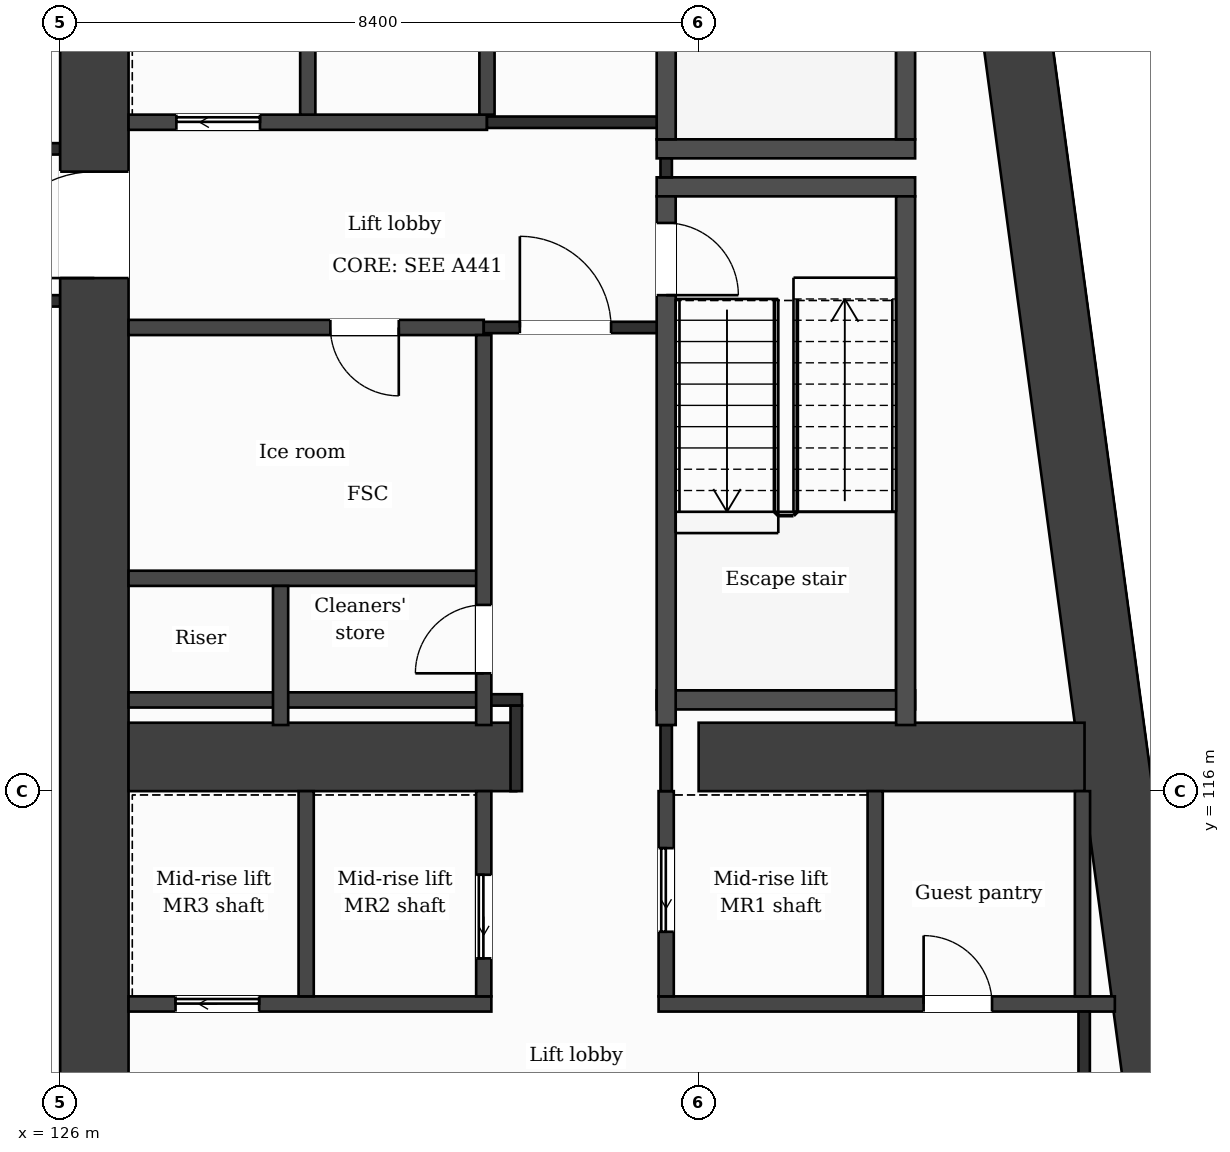
"""IFC4 building model, lengths in metres.
Left out: names, types, materials, properties, quantities, classifications, styles, units other than length and angle.
Written with IfcOpenShell. Run it as: python <this file> out.ifc"""

import sys

from ifc_helpers import new_model, si_unit, direction, frame, frame_2d, origin, place, context, subcontext, project, spatial, rectangle, extrude, element, fill, save


model = new_model("IFC4")
c1 = context("Model", 3, precision=1e-05, world=origin(), true_north=direction((0.0, 1.0)))
c2 = subcontext(c1, "Body", "Model", "MODEL_VIEW")
j1 = project(units=[si_unit("LENGTHUNIT", "METRE"), si_unit("PLANEANGLEUNIT", "RADIAN")], contexts=[c1])
p1 = place(None, origin())
s1 = spatial("IfcSite", under=j1, at=p1, CompositionType="ELEMENT")
p2 = place(p1, origin())
s2 = spatial("IfcBuilding", under=s1, at=p2, CompositionType="ELEMENT")
p3 = place(p2, frame((0.0, 0.0, 170.0)))
s3 = spatial("IfcBuildingStorey", under=s2, at=p3, CompositionType="ELEMENT", Elevation=170.0)
p4 = place(p3, frame((137.776, 131.95, 0.0), z_axis=(0.0, 0.0, 1.0), x_axis=(0.133421759112, -0.991059349482, 0.0)))
e1 = element("IfcWall", 1, at=p4, inside=s3, PredefinedType="SHEAR", context=c2, shape_type="SweptSolid", body=[
    extrude(rectangle(XDim=21.29, YDim=0.9, at=frame_2d((10.645, 0.0))), origin(), (0.0, 0.0, 1.0), 3.7),
])
p5 = place(p3, frame((126.45, 110.85, 0.0), z_axis=(0.0, 0.0, 1.0), x_axis=(0.0, 1.0, 0.0)))
e2 = element("IfcWall", 2, at=p5, inside=s3, PredefinedType="SHEAR", context=c2, shape_type="SweptSolid", body=[
    extrude(rectangle(XDim=21.1, YDim=0.9, at=frame_2d((10.55, 0.0))), origin(), (0.0, 0.0, 1.0), 3.7),
])
p6 = place(p5, frame((11.9, 0.0, 0.0)))
e3 = element("IfcOpeningElement", 3, at=p6, cuts=e2, PredefinedType="OPENING", context=c2, shape_type="SweptSolid", body=[
    extrude(rectangle(XDim=1.4, YDim=2.1, at=frame_2d((0.7, 1.05))), frame((0.0, 0.46, 0.0), z_axis=(0.0, -1.0, 0.0), x_axis=(1.0, 0.0, 0.0)), (0.0, 0.0, 1.0), 0.92),
])
p7 = place(p3, frame((126.9, 116.45, 0.0), z_axis=(0.0, 0.0, 1.0), x_axis=(1.0, 0.0, 0.0)))
e4 = element("IfcWall", 4, at=p7, inside=s3, PredefinedType="SHEAR", context=c2, shape_type="SweptSolid", body=[
    extrude(rectangle(XDim=5.1, YDim=0.9, at=frame_2d((2.55, 0.0))), origin(), (0.0, 0.0, 1.0), 3.7),
])
p8 = place(p3, frame((134.4, 116.45, 0.0), z_axis=(0.0, 0.0, 1.0), x_axis=(1.0, 0.0, 0.0)))
e5 = element("IfcWall", 5, at=p8, inside=s3, PredefinedType="SHEAR", context=c2, shape_type="SweptSolid", body=[
    extrude(rectangle(XDim=5.077, YDim=0.9, at=frame_2d((2.539, 0.0))), origin(), (0.0, 0.0, 1.0), 3.7),
])
p9 = place(p3, frame((126.9, 113.2, 0.0), z_axis=(0.0, 0.0, 1.0), x_axis=(1.0, 0.0, 0.0)))
e6 = element("IfcWall", 6, at=p9, inside=s3, PredefinedType="PARTITIONING", context=c2, shape_type="SweptSolid", body=[
    extrude(rectangle(XDim=4.773, YDim=0.2, at=frame_2d((2.387, 0.0))), origin(), (0.0, 0.0, 1.0), 3.38),
])
p10 = place(p9, frame((0.618, 0.0, 0.0)))
e7 = element("IfcOpeningElement", 7, at=p10, cuts=e6, PredefinedType="OPENING", context=c2, shape_type="SweptSolid", body=[
    extrude(rectangle(XDim=1.1, YDim=2.1, at=frame_2d((0.55, 1.05))), frame((0.0, 0.11, 0.0), z_axis=(0.0, -1.0, 0.0), x_axis=(1.0, 0.0, 0.0)), (0.0, 0.0, 1.0), 0.22),
])
p11 = place(p3, frame((133.873, 113.2, 0.0), z_axis=(0.0, 0.0, 1.0), x_axis=(1.0, 0.0, 0.0)))
e8 = element("IfcWall", 8, at=p11, inside=s3, PredefinedType="PARTITIONING", context=c2, shape_type="SweptSolid", body=[
    extrude(rectangle(XDim=6.003, YDim=0.2, at=frame_2d((3.001, 0.0))), origin(), (0.0, 0.0, 1.0), 3.38),
])
p12 = place(p11, frame((3.487, 0.0, 0.0)))
e9 = element("IfcOpeningElement", 9, at=p12, cuts=e8, PredefinedType="OPENING", context=c2, shape_type="SweptSolid", body=[
    extrude(rectangle(XDim=0.9, YDim=2.1, at=frame_2d((0.45, 1.05))), frame((0.0, 0.11, 0.0), z_axis=(0.0, -1.0, 0.0), x_axis=(1.0, 0.0, 0.0)), (0.0, 0.0, 1.0), 0.22),
])
p13 = place(p3, frame((126.9, 117.2, 0.0), z_axis=(0.0, 0.0, 1.0), x_axis=(1.0, 0.0, 0.0)))
e10 = element("IfcWall", 10, at=p13, inside=s3, PredefinedType="PARTITIONING", context=c2, shape_type="SweptSolid", body=[
    extrude(rectangle(XDim=4.673, YDim=0.2, at=frame_2d((2.336, 0.0))), origin(), (0.0, 0.0, 1.0), 3.38),
])
p14 = place(p3, frame((131.573, 117.2, 0.0), z_axis=(0.0, 0.0, 1.0), x_axis=(1.0, 0.0, 0.0)))
e11 = element("IfcWall", 11, at=p14, inside=s3, PredefinedType="PARTITIONING", context=c2, shape_type="SweptSolid", body=[
    extrude(rectangle(XDim=0.502, YDim=0.15, at=frame_2d((0.251, 0.0))), origin(), (0.0, 0.0, 1.0), 3.38),
])
p15 = place(p3, frame((133.848, 117.2, 0.0), z_axis=(0.0, 0.0, 1.0), x_axis=(1.0, 0.0, 0.0)))
e12 = element("IfcWall", 12, at=p15, inside=s3, PredefinedType="PARTITIONING", context=c2, shape_type="SweptSolid", body=[
    extrude(rectangle(XDim=3.4, YDim=0.25, at=frame_2d((1.7, 0.0))), origin(), (0.0, 0.0, 1.0), 3.38),
])
p16 = place(p3, frame((126.9, 118.8, 0.0), z_axis=(0.0, 0.0, 1.0), x_axis=(1.0, 0.0, 0.0)))
e13 = element("IfcWall", 13, at=p16, inside=s3, PredefinedType="PARTITIONING", context=c2, shape_type="SweptSolid", body=[
    extrude(rectangle(XDim=4.673, YDim=0.2, at=frame_2d((2.336, 0.0))), origin(), (0.0, 0.0, 1.0), 3.38),
])
p17 = place(p3, frame((126.9, 122.1, 0.0), z_axis=(0.0, 0.0, 1.0), x_axis=(1.0, 0.0, 0.0)))
e14 = element("IfcWall", 14, at=p17, inside=s3, PredefinedType="PARTITIONING", context=c2, shape_type="SweptSolid", body=[
    extrude(rectangle(XDim=4.673, YDim=0.2, at=frame_2d((2.336, 0.0))), origin(), (0.0, 0.0, 1.0), 3.38),
])
p18 = place(p17, frame((2.655, 0.0, 0.0)))
e15 = element("IfcOpeningElement", 15, at=p18, cuts=e14, PredefinedType="OPENING", context=c2, shape_type="SweptSolid", body=[
    extrude(rectangle(XDim=0.9, YDim=2.1, at=frame_2d((0.45, 1.05))), frame((0.0, 0.11, 0.0), z_axis=(0.0, -1.0, 0.0), x_axis=(1.0, 0.0, 0.0)), (0.0, 0.0, 1.0), 0.22),
])
p19 = place(p3, frame((131.573, 122.1, 0.0), z_axis=(0.0, 0.0, 1.0), x_axis=(1.0, 0.0, 0.0)))
e16 = element("IfcWall", 16, at=p19, inside=s3, PredefinedType="PARTITIONING", context=c2, shape_type="SweptSolid", body=[
    extrude(rectangle(XDim=2.4, YDim=0.15, at=frame_2d((1.2, 0.0))), origin(), (0.0, 0.0, 1.0), 3.38),
])
p20 = place(p19, frame((0.475, 0.0, 0.0)))
e17 = element("IfcOpeningElement", 17, at=p20, cuts=e16, PredefinedType="OPENING", context=c2, shape_type="SweptSolid", body=[
    extrude(rectangle(XDim=1.2, YDim=2.1, at=frame_2d((0.6, 1.05))), frame((0.0, 0.085, 0.0), z_axis=(0.0, -1.0, 0.0), x_axis=(1.0, 0.0, 0.0)), (0.0, 0.0, 1.0), 0.17),
])
p21 = place(p3, frame((100.8, 122.45, 0.0), z_axis=(0.0, 0.0, 1.0), x_axis=(1.0, 0.0, 0.0)))
e18 = element("IfcWall", 18, at=p21, inside=s3, PredefinedType="PARTITIONING", context=c2, shape_type="SweptSolid", body=[
    extrude(rectangle(XDim=25.2, YDim=0.15, at=frame_2d((12.6, 0.0))), origin(), (0.0, 0.0, 1.0), 3.38),
])
for number, where, z_axis, x_axis in (
    (19, (133.848, 123.95, 0.0), (0.0, 0.0, 1.0), (1.0, 0.0, 0.0)),
    (20, (133.848, 124.45, 0.0), (0.0, 0.0, 1.0), (1.0, 0.0, 0.0)),
):
    element("IfcWall", number, at=place(p3, frame(where, z_axis=z_axis, x_axis=x_axis)), inside=s3, PredefinedType="PARTITIONING", context=c2, shape_type="SweptSolid", body=[
        extrude(rectangle(XDim=3.4, YDim=0.25, at=frame_2d((1.7, 0.0))), origin(), (0.0, 0.0, 1.0), 3.38),
    ])
p22 = place(p3, frame((100.8, 124.45, 0.0), z_axis=(0.0, 0.0, 1.0), x_axis=(1.0, 0.0, 0.0)))
e21 = element("IfcWall", 21, at=p22, inside=s3, PredefinedType="PARTITIONING", context=c2, shape_type="SweptSolid", body=[
    extrude(rectangle(XDim=25.2, YDim=0.15, at=frame_2d((12.6, 0.0))), origin(), (0.0, 0.0, 1.0), 3.38),
])
p23 = place(p22, frame((4.275, 0.0, 0.0)))
e22 = element("IfcOpeningElement", 22, at=p23, cuts=e21, PredefinedType="OPENING", context=c2, shape_type="SweptSolid", body=[
    extrude(rectangle(XDim=1.0, YDim=2.1, at=frame_2d((0.5, 1.05))), frame((0.0, 0.085, 0.0), z_axis=(0.0, -1.0, 0.0), x_axis=(1.0, 0.0, 0.0)), (0.0, 0.0, 1.0), 0.17),
])
p24 = place(p22, frame((0.675, 0.0, 0.0)))
e23 = element("IfcOpeningElement", 23, at=p24, cuts=e21, PredefinedType="OPENING", context=c2, shape_type="SweptSolid", body=[
    extrude(rectangle(XDim=1.0, YDim=2.1, at=frame_2d((0.5, 1.05))), frame((0.0, 0.085, 0.0), z_axis=(0.0, -1.0, 0.0), x_axis=(1.0, 0.0, 0.0)), (0.0, 0.0, 1.0), 0.17),
])
p25 = place(p22, frame((10.425, 0.0, 0.0)))
e24 = element("IfcOpeningElement", 24, at=p25, cuts=e21, PredefinedType="OPENING", context=c2, shape_type="SweptSolid", body=[
    extrude(rectangle(XDim=1.0, YDim=2.1, at=frame_2d((0.5, 1.05))), frame((0.0, 0.085, 0.0), z_axis=(0.0, -1.0, 0.0), x_axis=(1.0, 0.0, 0.0)), (0.0, 0.0, 1.0), 0.17),
])
p26 = place(p22, frame((22.175, 0.0, 0.0)))
e25 = element("IfcOpeningElement", 25, at=p26, cuts=e21, PredefinedType="OPENING", context=c2, shape_type="SweptSolid", body=[
    extrude(rectangle(XDim=1.0, YDim=2.1, at=frame_2d((0.5, 1.05))), frame((0.0, 0.085, 0.0), z_axis=(0.0, -1.0, 0.0), x_axis=(1.0, 0.0, 0.0)), (0.0, 0.0, 1.0), 0.17),
])
p27 = place(p3, frame((126.9, 124.8, 0.0), z_axis=(0.0, 0.0, 1.0), x_axis=(1.0, 0.0, 0.0)))
e26 = element("IfcWall", 26, at=p27, inside=s3, PredefinedType="PARTITIONING", context=c2, shape_type="SweptSolid", body=[
    extrude(rectangle(XDim=4.715, YDim=0.2, at=frame_2d((2.358, 0.0))), origin(), (0.0, 0.0, 1.0), 3.38),
])
p28 = place(p27, frame((0.629, 0.0, 0.0)))
e27 = element("IfcOpeningElement", 27, at=p28, cuts=e26, PredefinedType="OPENING", context=c2, shape_type="SweptSolid", body=[
    extrude(rectangle(XDim=1.1, YDim=2.1, at=frame_2d((0.55, 1.05))), frame((0.0, 0.11, 0.0), z_axis=(0.0, -1.0, 0.0), x_axis=(1.0, 0.0, 0.0)), (0.0, 0.0, 1.0), 0.22),
])
p29 = place(p3, frame((131.615, 124.8, 0.0), z_axis=(0.0, 0.0, 1.0), x_axis=(1.0, 0.0, 0.0)))
e28 = element("IfcWall", 28, at=p29, inside=s3, PredefinedType="PARTITIONING", context=c2, shape_type="SweptSolid", body=[
    extrude(rectangle(XDim=2.483, YDim=0.15, at=frame_2d((1.241, 0.0))), origin(), (0.0, 0.0, 1.0), 3.38),
])
p30 = place(p3, frame((128.9, 116.87, 0.0), z_axis=(0.0, 0.0, 1.0), x_axis=(0.0, 1.0, 0.0)))
e29 = element("IfcWall", 29, at=p30, inside=s3, PredefinedType="PARTITIONING", context=c2, shape_type="SweptSolid", body=[
    extrude(rectangle(XDim=1.83, YDim=0.2, at=frame_2d((0.915, 0.0))), origin(), (0.0, 0.0, 1.0), 3.38),
])
p31 = place(p3, frame((129.237, 113.3, 0.0), z_axis=(0.0, 0.0, 1.0), x_axis=(0.0, 1.0, 0.0)))
e30 = element("IfcWall", 30, at=p31, inside=s3, PredefinedType="PARTITIONING", context=c2, shape_type="SweptSolid", body=[
    extrude(rectangle(XDim=2.7, YDim=0.2, at=frame_2d((1.35, 0.0))), origin(), (0.0, 0.0, 1.0), 3.38),
])
p32 = place(p3, frame((129.258, 124.9, 0.0), z_axis=(0.0, 0.0, 1.0), x_axis=(0.0, 1.0, 0.0)))
e31 = element("IfcWall", 31, at=p32, inside=s3, PredefinedType="PARTITIONING", context=c2, shape_type="SweptSolid", body=[
    extrude(rectangle(XDim=3.1, YDim=0.2, at=frame_2d((1.55, 0.0))), origin(), (0.0, 0.0, 1.0), 3.38),
])
p33 = place(p3, frame((131.573, 113.3, 0.0), z_axis=(0.0, 0.0, 1.0), x_axis=(0.0, 1.0, 0.0)))
e32 = element("IfcWall", 32, at=p33, inside=s3, PredefinedType="PARTITIONING", context=c2, shape_type="SweptSolid", body=[
    extrude(rectangle(XDim=2.7, YDim=0.2, at=frame_2d((1.35, 0.0))), origin(), (0.0, 0.0, 1.0), 3.38),
])
p34 = place(p33, frame((0.5, 0.0, 0.0)))
e33 = element("IfcOpeningElement", 33, at=p34, cuts=e32, PredefinedType="OPENING", context=c2, shape_type="SweptSolid", body=[
    extrude(rectangle(XDim=1.1, YDim=2.1, at=frame_2d((0.55, 1.05))), frame((0.0, 0.11, 0.0), z_axis=(0.0, -1.0, 0.0), x_axis=(1.0, 0.0, 0.0)), (0.0, 0.0, 1.0), 0.22),
])
p35 = place(p3, frame((131.573, 116.87, 0.0), z_axis=(0.0, 0.0, 1.0), x_axis=(0.0, 1.0, 0.0)))
e34 = element("IfcWall", 34, at=p35, inside=s3, PredefinedType="PARTITIONING", context=c2, shape_type="SweptSolid", body=[
    extrude(rectangle(XDim=5.13, YDim=0.2, at=frame_2d((2.565, 0.0))), origin(), (0.0, 0.0, 1.0), 3.38),
])
p36 = place(p35, frame((0.68, 0.0, 0.0)))
e35 = element("IfcOpeningElement", 35, at=p36, cuts=e34, PredefinedType="OPENING", context=c2, shape_type="SweptSolid", body=[
    extrude(rectangle(XDim=0.9, YDim=2.1, at=frame_2d((0.45, 1.05))), frame((0.0, 0.11, 0.0), z_axis=(0.0, -1.0, 0.0), x_axis=(1.0, 0.0, 0.0)), (0.0, 0.0, 1.0), 0.22),
])
p37 = place(p3, frame((131.615, 124.9, 0.0), z_axis=(0.0, 0.0, 1.0), x_axis=(0.0, 1.0, 0.0)))
e36 = element("IfcWall", 36, at=p37, inside=s3, PredefinedType="PARTITIONING", context=c2, shape_type="SweptSolid", body=[
    extrude(rectangle(XDim=3.1, YDim=0.2, at=frame_2d((1.55, 0.0))), origin(), (0.0, 0.0, 1.0), 3.38),
])
p38 = place(p3, frame((132.0, 116.0, 0.0), z_axis=(0.0, 0.0, 1.0), x_axis=(0.0, 1.0, 0.0)))
e37 = element("IfcWall", 37, at=p38, inside=s3, PredefinedType="PARTITIONING", context=c2, shape_type="SweptSolid", body=[
    extrude(rectangle(XDim=1.125, YDim=0.15, at=frame_2d((0.562, 0.0))), origin(), (0.0, 0.0, 1.0), 3.38),
])
p39 = place(p3, frame((133.973, 113.3, 0.0), z_axis=(0.0, 0.0, 1.0), x_axis=(0.0, 1.0, 0.0)))
e38 = element("IfcWall", 38, at=p39, inside=s3, PredefinedType="PARTITIONING", context=c2, shape_type="SweptSolid", body=[
    extrude(rectangle(XDim=2.7, YDim=0.2, at=frame_2d((1.35, 0.0))), origin(), (0.0, 0.0, 1.0), 3.38),
])
p40 = place(p39, frame((0.85, 0.0, 0.0)))
e39 = element("IfcOpeningElement", 39, at=p40, cuts=e38, PredefinedType="OPENING", context=c2, shape_type="SweptSolid", body=[
    extrude(rectangle(XDim=1.1, YDim=2.1, at=frame_2d((0.55, 1.05))), frame((0.0, 0.11, 0.0), z_axis=(0.0, -1.0, 0.0), x_axis=(1.0, 0.0, 0.0)), (0.0, 0.0, 1.0), 0.22),
])
p41 = place(p3, frame((133.973, 116.0, 0.0), z_axis=(0.0, 0.0, 1.0), x_axis=(0.0, 1.0, 0.0)))
e40 = element("IfcWall", 40, at=p41, inside=s3, PredefinedType="PARTITIONING", context=c2, shape_type="SweptSolid", body=[
    extrude(rectangle(XDim=0.87, YDim=0.15, at=frame_2d((0.435, 0.0))), origin(), (0.0, 0.0, 1.0), 3.38),
])
p42 = place(p3, frame((133.973, 124.075, 0.0), z_axis=(0.0, 0.0, 1.0), x_axis=(0.0, 1.0, 0.0)))
e41 = element("IfcWall", 41, at=p42, inside=s3, PredefinedType="PARTITIONING", context=c2, shape_type="SweptSolid", body=[
    extrude(rectangle(XDim=0.25, YDim=0.15, at=frame_2d((0.125, 0.0))), origin(), (0.0, 0.0, 1.0), 3.38),
])
p43 = place(p3, frame((133.973, 116.87, 0.0), z_axis=(0.0, 0.0, 1.0), x_axis=(0.0, 1.0, 0.0)))
e42 = element("IfcWall", 42, at=p43, inside=s3, PredefinedType="PARTITIONING", context=c2, shape_type="SweptSolid", body=[
    extrude(rectangle(XDim=6.955, YDim=0.25, at=frame_2d((3.478, 0.0))), origin(), (0.0, 0.0, 1.0), 3.38),
])
p44 = place(p43, frame((5.655, 0.0, 0.0)))
e43 = element("IfcOpeningElement", 43, at=p44, cuts=e42, PredefinedType="OPENING", context=c2, shape_type="SweptSolid", body=[
    extrude(rectangle(XDim=0.95, YDim=2.1, at=frame_2d((0.475, 1.05))), frame((0.0, 0.135, 0.0), z_axis=(0.0, -1.0, 0.0), x_axis=(1.0, 0.0, 0.0)), (0.0, 0.0, 1.0), 0.27),
])
p45 = place(p3, frame((133.973, 124.575, 0.0), z_axis=(0.0, 0.0, 1.0), x_axis=(0.0, 1.0, 0.0)))
e44 = element("IfcWall", 44, at=p45, inside=s3, PredefinedType="PARTITIONING", context=c2, shape_type="SweptSolid", body=[
    extrude(rectangle(XDim=6.955, YDim=0.25, at=frame_2d((3.478, 0.0))), origin(), (0.0, 0.0, 1.0), 3.38),
])
p46 = place(p45, frame((5.325, 0.0, 0.0)))
e45 = element("IfcOpeningElement", 45, at=p46, cuts=e44, PredefinedType="OPENING", context=c2, shape_type="SweptSolid", body=[
    extrude(rectangle(XDim=1.0, YDim=2.1, at=frame_2d((0.5, 1.05))), frame((0.0, 0.135, 0.0), z_axis=(0.0, -1.0, 0.0), x_axis=(1.0, 0.0, 0.0)), (0.0, 0.0, 1.0), 0.27),
])
p47 = place(p3, frame((136.722, 113.3, 0.0), z_axis=(0.0, 0.0, 1.0), x_axis=(0.0, 1.0, 0.0)))
e46 = element("IfcWall", 46, at=p47, inside=s3, PredefinedType="PARTITIONING", context=c2, shape_type="SweptSolid", body=[
    extrude(rectangle(XDim=2.7, YDim=0.2, at=frame_2d((1.35, 0.0))), origin(), (0.0, 0.0, 1.0), 3.38),
])
p48 = place(p3, frame((137.123, 116.87, 0.0), z_axis=(0.0, 0.0, 1.0), x_axis=(0.0, 1.0, 0.0)))
e47 = element("IfcWall", 47, at=p48, inside=s3, PredefinedType="PARTITIONING", context=c2, shape_type="SweptSolid", body=[
    extrude(rectangle(XDim=6.955, YDim=0.25, at=frame_2d((3.478, 0.0))), origin(), (0.0, 0.0, 1.0), 3.38),
])
p49 = place(p3, frame((137.123, 124.575, 0.0), z_axis=(0.0, 0.0, 1.0), x_axis=(0.0, 1.0, 0.0)))
e48 = element("IfcWall", 48, at=p49, inside=s3, PredefinedType="PARTITIONING", context=c2, shape_type="SweptSolid", body=[
    extrude(rectangle(XDim=6.955, YDim=0.25, at=frame_2d((3.478, 0.0))), origin(), (0.0, 0.0, 1.0), 3.38),
])
p50 = place(p3, frame((139.45, 113.3, 0.0), z_axis=(0.0, 0.0, 1.0), x_axis=(0.0, 1.0, 0.0)))
e49 = element("IfcWall", 49, at=p50, inside=s3, PredefinedType="PARTITIONING", context=c2, shape_type="SweptSolid", body=[
    extrude(rectangle(XDim=2.7, YDim=0.2, at=frame_2d((1.35, 0.0))), origin(), (0.0, 0.0, 1.0), 3.38),
])
p51 = place(p3, frame((139.472, 111.3, 0.0), z_axis=(0.0, 0.0, 1.0), x_axis=(0.0, 1.0, 0.0)))
e50 = element("IfcWall", 50, at=p51, inside=s3, PredefinedType="PARTITIONING", context=c2, shape_type="SweptSolid", body=[
    extrude(rectangle(XDim=1.8, YDim=0.15, at=frame_2d((0.9, 0.0))), origin(), (0.0, 0.0, 1.0), 3.38),
])
p52 = place(p20, origin())
e51 = element("IfcDoor", 51, at=p52, inside=s3, OperationType="SINGLE_SWING_LEFT", PredefinedType="DOOR", context=c2, shape_type="SweptSolid", body=[
    extrude(rectangle(XDim=1.2, YDim=2.1, at=frame_2d((0.6, 1.05))), frame((0.0, 0.025, 0.0), z_axis=(0.0, -1.0, 0.0), x_axis=(1.0, 0.0, 0.0)), (0.0, 0.0, 1.0), 0.05),
])
fill(e17, e51)
p53 = place(p28, origin())
e52 = element("IfcDoor", 52, at=p53, inside=s3, OperationType="SLIDING_TO_LEFT", PredefinedType="DOOR", context=c2, shape_type="SweptSolid", body=[
    extrude(rectangle(XDim=1.1, YDim=2.1, at=frame_2d((0.55, 1.05))), frame((0.0, 0.025, 0.0), z_axis=(0.0, -1.0, 0.0), x_axis=(1.0, 0.0, 0.0)), (0.0, 0.0, 1.0), 0.05),
])
fill(e27, e52)
p54 = place(p18, origin())
e53 = element("IfcDoor", 53, at=p54, inside=s3, OperationType="SINGLE_SWING_RIGHT", PredefinedType="DOOR", context=c2, shape_type="SweptSolid", body=[
    extrude(rectangle(XDim=0.9, YDim=2.1, at=frame_2d((0.45, 1.05))), frame((0.0, 0.025, 0.0), z_axis=(0.0, -1.0, 0.0), x_axis=(1.0, 0.0, 0.0)), (0.0, 0.0, 1.0), 0.05),
])
fill(e15, e53)
p55 = place(p44, origin())
e54 = element("IfcDoor", 54, at=p55, inside=s3, OperationType="SINGLE_SWING_LEFT", PredefinedType="DOOR", context=c2, shape_type="SweptSolid", body=[
    extrude(rectangle(XDim=0.95, YDim=2.1, at=frame_2d((0.475, 1.05))), frame((0.0, 0.025, 0.0), z_axis=(0.0, -1.0, 0.0), x_axis=(1.0, 0.0, 0.0)), (0.0, 0.0, 1.0), 0.05),
])
fill(e43, e54)
p56 = place(p36, origin())
e55 = element("IfcDoor", 55, at=p56, inside=s3, OperationType="SINGLE_SWING_LEFT", PredefinedType="DOOR", context=c2, shape_type="SweptSolid", body=[
    extrude(rectangle(XDim=0.9, YDim=2.1, at=frame_2d((0.45, 1.05))), frame((0.0, 0.025, 0.0), z_axis=(0.0, -1.0, 0.0), x_axis=(1.0, 0.0, 0.0)), (0.0, 0.0, 1.0), 0.05),
])
fill(e35, e55)
p57 = place(p40, origin())
e56 = element("IfcDoor", 56, at=p57, inside=s3, OperationType="SLIDING_TO_LEFT", PredefinedType="DOOR", context=c2, shape_type="SweptSolid", body=[
    extrude(rectangle(XDim=1.1, YDim=2.1, at=frame_2d((0.55, 1.05))), frame((0.0, 0.025, 0.0), z_axis=(0.0, -1.0, 0.0), x_axis=(1.0, 0.0, 0.0)), (0.0, 0.0, 1.0), 0.05),
])
fill(e39, e56)
p58 = place(p34, origin())
e57 = element("IfcDoor", 57, at=p58, inside=s3, OperationType="SLIDING_TO_LEFT", PredefinedType="DOOR", context=c2, shape_type="SweptSolid", body=[
    extrude(rectangle(XDim=1.1, YDim=2.1, at=frame_2d((0.55, 1.05))), frame((0.0, 0.025, 0.0), z_axis=(0.0, -1.0, 0.0), x_axis=(1.0, 0.0, 0.0)), (0.0, 0.0, 1.0), 0.05),
])
fill(e33, e57)
p59 = place(p10, origin())
e58 = element("IfcDoor", 58, at=p59, inside=s3, OperationType="SLIDING_TO_LEFT", PredefinedType="DOOR", context=c2, shape_type="SweptSolid", body=[
    extrude(rectangle(XDim=1.1, YDim=2.1, at=frame_2d((0.55, 1.05))), frame((0.0, 0.025, 0.0), z_axis=(0.0, -1.0, 0.0), x_axis=(1.0, 0.0, 0.0)), (0.0, 0.0, 1.0), 0.05),
])
fill(e7, e58)
p60 = place(p12, origin())
e59 = element("IfcDoor", 59, at=p60, inside=s3, OperationType="SINGLE_SWING_LEFT", PredefinedType="DOOR", context=c2, shape_type="SweptSolid", body=[
    extrude(rectangle(XDim=0.9, YDim=2.1, at=frame_2d((0.45, 1.05))), frame((0.0, 0.025, 0.0), z_axis=(0.0, -1.0, 0.0), x_axis=(1.0, 0.0, 0.0)), (0.0, 0.0, 1.0), 0.05),
])
fill(e9, e59)
p61 = place(p6, origin())
e60 = element("IfcDoor", 60, at=p61, inside=s3, OperationType="SINGLE_SWING_LEFT", PredefinedType="DOOR", context=c2, shape_type="SweptSolid", body=[
    extrude(rectangle(XDim=1.4, YDim=2.1, at=frame_2d((0.7, 1.05))), frame((0.0, 0.025, 0.0), z_axis=(0.0, -1.0, 0.0), x_axis=(1.0, 0.0, 0.0)), (0.0, 0.0, 1.0), 0.05),
])
fill(e3, e60)
save(model, sys.argv[1])
